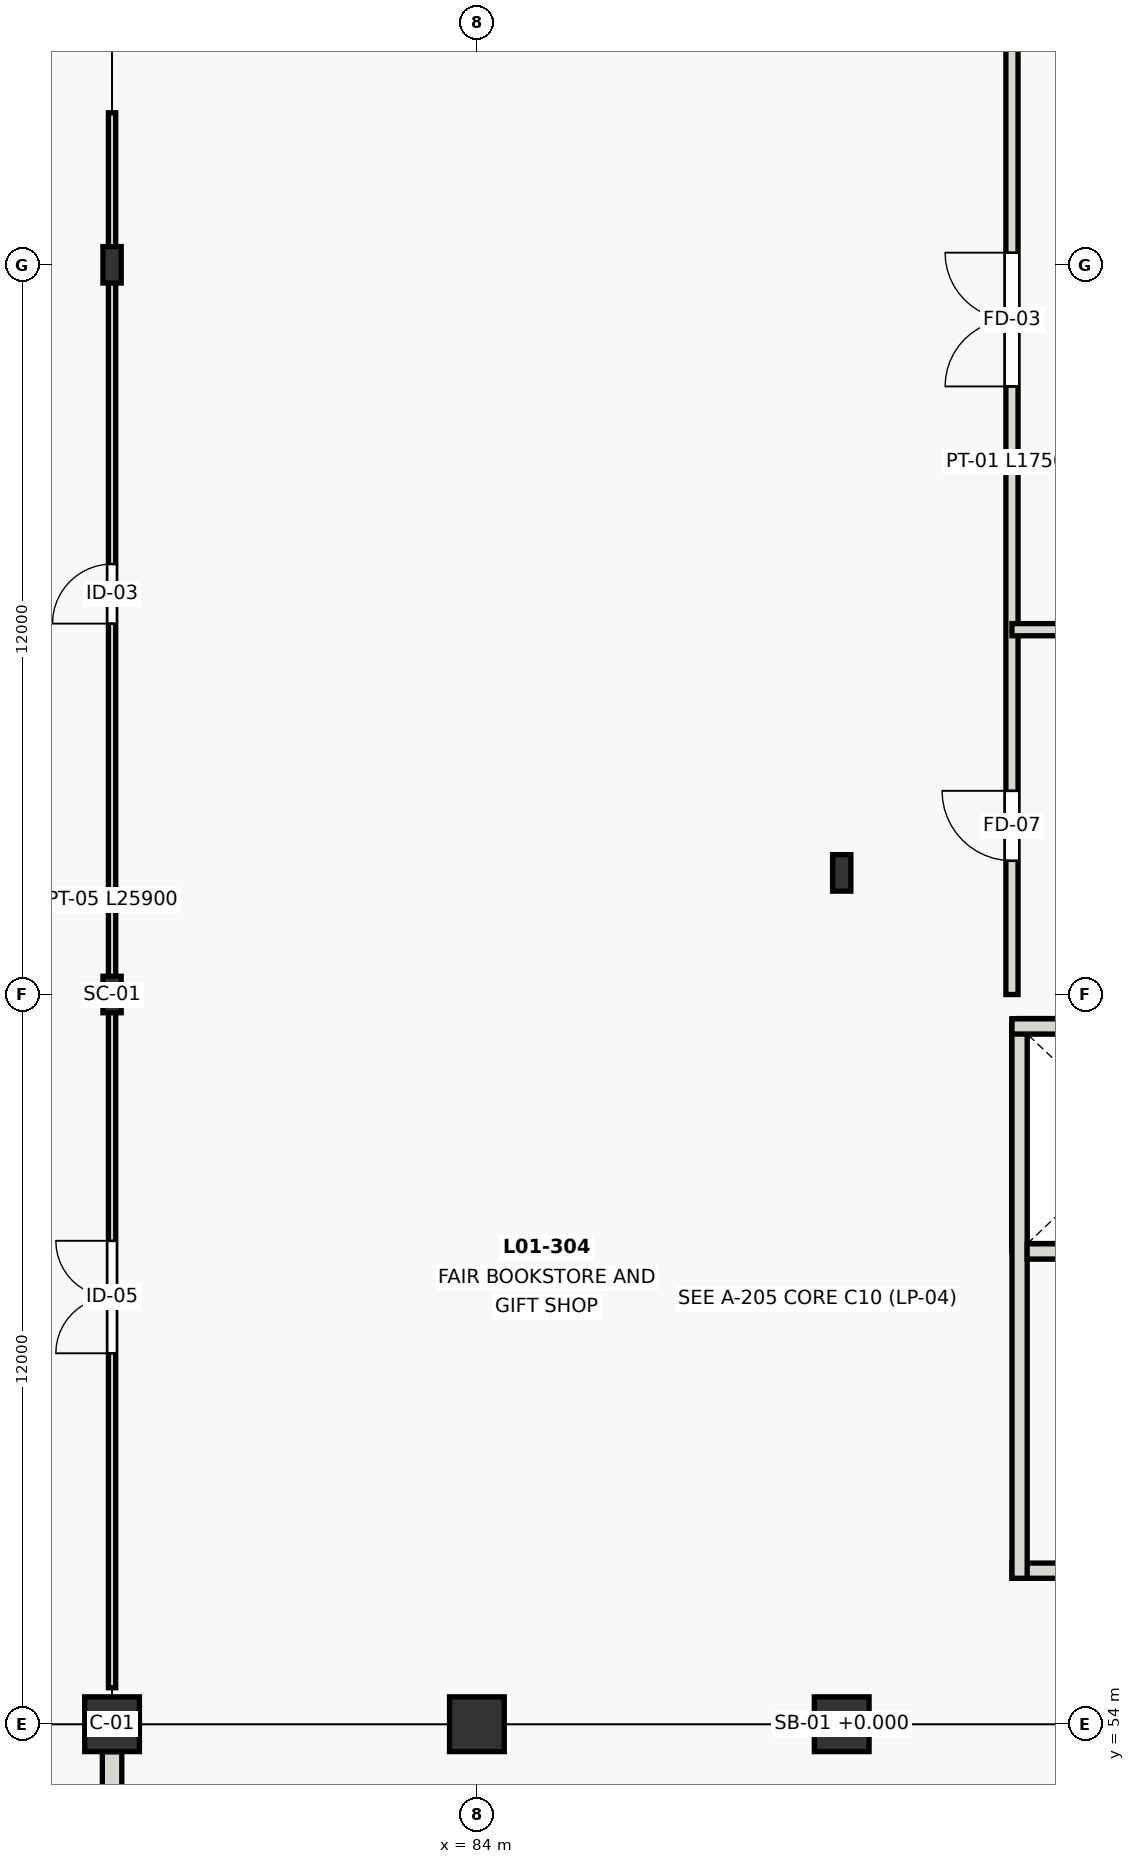
"""IFC4 building model, lengths in metres.
Left out: names, types, materials, properties, quantities, classifications, styles, units other than length and angle.
Written with IfcOpenShell. Run it as: python <this file> out.ifc"""

import sys

from ifc_helpers import new_model, si_unit, direction, frame, frame_2d, origin, origin_2d, place, context, subcontext, project, spatial, rectangle, i_section, extrude, element, fill, save


model = new_model("IFC4")
c1 = context("Model", 3, precision=1e-05, world=origin(), true_north=direction((0.0, 1.0)))
c2 = subcontext(c1, "Body", "Model", "MODEL_VIEW")
j1 = project(units=[si_unit("LENGTHUNIT", "METRE"), si_unit("PLANEANGLEUNIT", "RADIAN")], contexts=[c1])
p1 = place(None, origin())
s1 = spatial("IfcSite", under=j1, at=p1, CompositionType="ELEMENT")
p2 = place(p1, origin())
s2 = spatial("IfcBuilding", under=s1, at=p2, CompositionType="ELEMENT")
p3 = place(p2, origin())
s3 = spatial("IfcBuildingStorey", under=s2, at=p3, CompositionType="ELEMENT", Elevation=0.0)
for number, where, z_axis, x_axis in (
    (1, (78.0, 54.0, 0.0), (0.0, 0.0, 1.0), (1.0, 0.0, 0.0)),
    (2, (84.0, 54.0, 0.0), (0.0, 0.0, 1.0), (1.0, 0.0, 0.0)),
    (3, (90.0, 54.0, 0.0), (0.0, 0.0, 1.0), (1.0, 0.0, 0.0)),
):
    element("IfcColumn", number, at=place(p3, frame(where, z_axis=z_axis, x_axis=x_axis)), inside=s3, PredefinedType="COLUMN", context=c2, shape_type="SweptSolid", body=[
        extrude(rectangle(XDim=0.9, YDim=0.9, at=origin_2d()), origin(), (0.0, 0.0, 1.0), 4.2),
    ])
for number, where, z_axis, x_axis in (
    (4, (78.0, 66.0, 0.0), (0.0, 0.0, 1.0), (1.0, 0.0, 0.0)),
    (5, (90.0, 68.0, 0.0), (0.0, 0.0, 1.0), (1.0, 0.0, 0.0)),
    (6, (78.0, 78.0, 0.0), (0.0, 0.0, 1.0), (1.0, 0.0, 0.0)),
):
    element("IfcColumn", number, at=place(p3, frame(where, z_axis=z_axis, x_axis=x_axis)), inside=s3, PredefinedType="COLUMN", context=c2, shape_type="SweptSolid", body=[
        extrude(i_section(OverallWidth=0.3, OverallDepth=0.6, WebThickness=0.015, FlangeThickness=0.03, at=origin_2d()), origin(), (0.0, 0.0, 1.0), 4.2),
    ])
p4 = place(p3, frame((96.82, 65.48, -1.6), z_axis=(0.0, 0.0, 1.0), x_axis=(-1.0, 0.0, 0.0)))
e7 = element("IfcWall", 7, at=p4, inside=s3, PredefinedType="SHEAR", context=c2, shape_type="SweptSolid", body=[
    extrude(rectangle(XDim=3.9, YDim=0.25, at=frame_2d((1.95, 0.0))), origin(), (0.0, 0.0, 1.0), 1.6),
])
p5 = place(p3, frame((92.92, 65.48, -1.6), z_axis=(0.0, 0.0, 1.0), x_axis=(0.0, -1.0, 0.0)))
e8 = element("IfcWall", 8, at=p5, inside=s3, PredefinedType="SHEAR", context=c2, shape_type="SweptSolid", body=[
    extrude(rectangle(XDim=3.7, YDim=0.25, at=frame_2d((1.85, 0.0))), origin(), (0.0, 0.0, 1.0), 1.6),
])
p6 = place(p3, frame((92.92, 61.78, -1.6), z_axis=(0.0, 0.0, 1.0), x_axis=(1.0, 0.0, 0.0)))
e9 = element("IfcWall", 9, at=p6, inside=s3, PredefinedType="SHEAR", context=c2, shape_type="SweptSolid", body=[
    extrude(rectangle(XDim=3.9, YDim=0.25, at=frame_2d((1.95, 0.0))), origin(), (0.0, 0.0, 1.0), 1.6),
])
p7 = place(p3, frame((102.0, 56.525, 0.0), z_axis=(0.0, 0.0, 1.0), x_axis=(-1.0, 0.0, 0.0)))
e10 = element("IfcWall", 10, at=p7, inside=s3, PredefinedType="SHEAR", context=c2, shape_type="SweptSolid", body=[
    extrude(rectangle(XDim=9.2, YDim=0.25, at=frame_2d((4.6, 0.0))), origin(), (0.0, 0.0, 1.0), 4.2),
])
p8 = place(p3, frame((92.925, 56.4, 0.0), z_axis=(0.0, 0.0, 1.0), x_axis=(0.0, 1.0, 0.0)))
e11 = element("IfcWall", 11, at=p8, inside=s3, PredefinedType="SHEAR", context=c2, shape_type="SweptSolid", body=[
    extrude(rectangle(XDim=9.2, YDim=0.25, at=frame_2d((4.6, 0.0))), origin(), (0.0, 0.0, 1.0), 4.2),
])
p9 = place(p3, frame((102.0, 65.475, 0.0), z_axis=(0.0, 0.0, 1.0), x_axis=(-1.0, 0.0, 0.0)))
e12 = element("IfcWall", 12, at=p9, inside=s3, PredefinedType="SHEAR", context=c2, shape_type="SweptSolid", body=[
    extrude(rectangle(XDim=9.2, YDim=0.25, at=frame_2d((4.6, 0.0))), origin(), (0.0, 0.0, 1.0), 4.2),
])
p10 = place(p9, frame((1.8, 0.0, 0.0)))
e13 = element("IfcOpeningElement", 13, at=p10, cuts=e12, PredefinedType="OPENING", context=c2, shape_type="SweptSolid", body=[
    extrude(rectangle(XDim=1.8, YDim=2.15, at=frame_2d((0.9, 1.075))), frame((0.0, 0.135, 0.0), z_axis=(0.0, -1.0, 0.0), x_axis=(1.0, 0.0, 0.0)), (0.0, 0.0, 1.0), 0.27),
])
p11 = place(p3, frame((101.75, 61.775, 0.0), z_axis=(0.0, 0.0, 1.0), x_axis=(-1.0, 0.0, 0.0)))
e14 = element("IfcWall", 14, at=p11, inside=s3, PredefinedType="SHEAR", context=c2, shape_type="SweptSolid", body=[
    extrude(rectangle(XDim=8.7, YDim=0.25, at=frame_2d((4.35, 0.0))), origin(), (0.0, 0.0, 1.0), 4.2),
])
p12 = place(p11, frame((0.25, 0.0, 0.0)))
e15 = element("IfcOpeningElement", 15, at=p12, cuts=e14, PredefinedType="OPENING", context=c2, shape_type="SweptSolid", body=[
    extrude(rectangle(XDim=1.65, YDim=2.1, at=frame_2d((0.825, 1.05))), frame((0.0, 0.135, 0.0), z_axis=(0.0, -1.0, 0.0), x_axis=(1.0, 0.0, 0.0)), (0.0, 0.0, 1.0), 0.27),
])
p13 = place(p3, frame((78.0, 36.302, 0.0), z_axis=(0.0, 0.0, 1.0), x_axis=(0.0, 1.0, 0.0)))
e16 = element("IfcWall", 16, at=p13, inside=s3, PredefinedType="SHEAR", context=c2, shape_type="SweptSolid", body=[
    extrude(rectangle(XDim=17.246, YDim=0.32, at=frame_2d((8.623, 0.0))), origin(), (0.0, 0.0, 1.0), 3.8),
])
p14 = place(p13, frame((7.048, 0.0, 0.0)))
e17 = element("IfcOpeningElement", 17, at=p14, cuts=e16, PredefinedType="OPENING", context=c2, shape_type="SweptSolid", body=[
    extrude(rectangle(XDim=2.5, YDim=2.4, at=frame_2d((1.25, 1.2))), frame((0.0, 0.17, 0.0), z_axis=(0.0, -1.0, 0.0), x_axis=(1.0, 0.0, 0.0)), (0.0, 0.0, 1.0), 0.34),
])
p15 = place(p3, frame((78.0, 54.6, 0.0), z_axis=(0.0, 0.0, 1.0), x_axis=(0.0, 1.0, 0.0)))
e18 = element("IfcWall", 18, at=p15, inside=s3, PredefinedType="PARTITIONING", context=c2, shape_type="SweptSolid", body=[
    extrude(rectangle(XDim=25.9, YDim=0.12, at=frame_2d((12.95, 0.0))), origin(), (0.0, 0.0, 1.0), 3.5),
])
p16 = place(p15, frame((5.5, 0.0, 0.0)))
e19 = element("IfcOpeningElement", 19, at=p16, cuts=e18, PredefinedType="OPENING", context=c2, shape_type="SweptSolid", body=[
    extrude(rectangle(XDim=1.85, YDim=2.25, at=frame_2d((0.925, 1.125))), frame((0.0, 0.07, 0.0), z_axis=(0.0, -1.0, 0.0), x_axis=(1.0, 0.0, 0.0)), (0.0, 0.0, 1.0), 0.14),
])
p17 = place(p15, frame((17.5, 0.0, 0.0)))
e20 = element("IfcOpeningElement", 20, at=p17, cuts=e18, PredefinedType="OPENING", context=c2, shape_type="SweptSolid", body=[
    extrude(rectangle(XDim=0.98, YDim=2.1, at=frame_2d((0.49, 1.05))), frame((0.0, 0.07, 0.0), z_axis=(0.0, -1.0, 0.0), x_axis=(1.0, 0.0, 0.0)), (0.0, 0.0, 1.0), 0.14),
])
p18 = place(p3, frame((92.8, 66.0, 0.0), z_axis=(0.0, 0.0, 1.0), x_axis=(0.0, 1.0, 0.0)))
e21 = element("IfcWall", 21, at=p18, inside=s3, PredefinedType="PARTITIONING", context=c2, shape_type="SweptSolid", body=[
    extrude(rectangle(XDim=17.5, YDim=0.2, at=frame_2d((8.75, 0.0))), origin(), (0.0, 0.0, 1.0), 3.72),
])
p19 = place(p18, frame((2.2, 0.0, 0.0)))
e22 = element("IfcOpeningElement", 22, at=p19, cuts=e21, PredefinedType="OPENING", context=c2, shape_type="SweptSolid", body=[
    extrude(rectangle(XDim=1.15, YDim=2.1, at=frame_2d((0.575, 1.05))), frame((0.0, 0.11, 0.0), z_axis=(0.0, -1.0, 0.0), x_axis=(1.0, 0.0, 0.0)), (0.0, 0.0, 1.0), 0.22),
])
p20 = place(p18, frame((10.0, 0.0, 0.0)))
e23 = element("IfcOpeningElement", 23, at=p20, cuts=e21, PredefinedType="OPENING", context=c2, shape_type="SweptSolid", body=[
    extrude(rectangle(XDim=2.2, YDim=2.3, at=frame_2d((1.1, 1.15))), frame((0.0, 0.11, 0.0), z_axis=(0.0, -1.0, 0.0), x_axis=(1.0, 0.0, 0.0)), (0.0, 0.0, 1.0), 0.22),
])
p21 = place(p3, frame((92.8, 72.0, 0.0), z_axis=(0.0, 0.0, 1.0), x_axis=(1.0, 0.0, 0.0)))
e24 = element("IfcWall", 24, at=p21, inside=s3, PredefinedType="PARTITIONING", context=c2, shape_type="SweptSolid", body=[
    extrude(rectangle(XDim=8.8, YDim=0.2, at=frame_2d((4.4, 0.0))), origin(), (0.0, 0.0, 1.0), 3.72),
])
p22 = place(p16, origin())
e25 = element("IfcDoor", 25, at=p22, inside=s3, OperationType="DOUBLE_DOOR_SINGLE_SWING", PredefinedType="DOOR", context=c2, shape_type="SweptSolid", body=[
    extrude(rectangle(XDim=1.85, YDim=2.25, at=frame_2d((0.925, 1.125))), frame((0.0, 0.025, 0.0), z_axis=(0.0, -1.0, 0.0), x_axis=(1.0, 0.0, 0.0)), (0.0, 0.0, 1.0), 0.05),
])
fill(e19, e25)
p23 = place(p17, origin())
e26 = element("IfcDoor", 26, at=p23, inside=s3, OperationType="SINGLE_SWING_LEFT", PredefinedType="DOOR", context=c2, shape_type="SweptSolid", body=[
    extrude(rectangle(XDim=0.98, YDim=2.1, at=frame_2d((0.49, 1.05))), frame((0.0, 0.025, 0.0), z_axis=(0.0, -1.0, 0.0), x_axis=(1.0, 0.0, 0.0)), (0.0, 0.0, 1.0), 0.05),
])
fill(e20, e26)
p24 = place(p19, origin())
e27 = element("IfcDoor", 27, at=p24, inside=s3, OperationType="SINGLE_SWING_RIGHT", PredefinedType="DOOR", context=c2, shape_type="SweptSolid", body=[
    extrude(rectangle(XDim=1.15, YDim=2.1, at=frame_2d((0.575, 1.05))), frame((0.0, 0.025, 0.0), z_axis=(0.0, -1.0, 0.0), x_axis=(1.0, 0.0, 0.0)), (0.0, 0.0, 1.0), 0.05),
])
fill(e22, e27)
p25 = place(p20, origin())
e28 = element("IfcDoor", 28, at=p25, inside=s3, OperationType="DOUBLE_DOOR_SINGLE_SWING", PredefinedType="DOOR", context=c2, shape_type="SweptSolid", body=[
    extrude(rectangle(XDim=2.2, YDim=2.3, at=frame_2d((1.1, 1.15))), frame((0.0, 0.025, 0.0), z_axis=(0.0, -1.0, 0.0), x_axis=(1.0, 0.0, 0.0)), (0.0, 0.0, 1.0), 0.05),
])
fill(e23, e28)
save(model, sys.argv[1])
